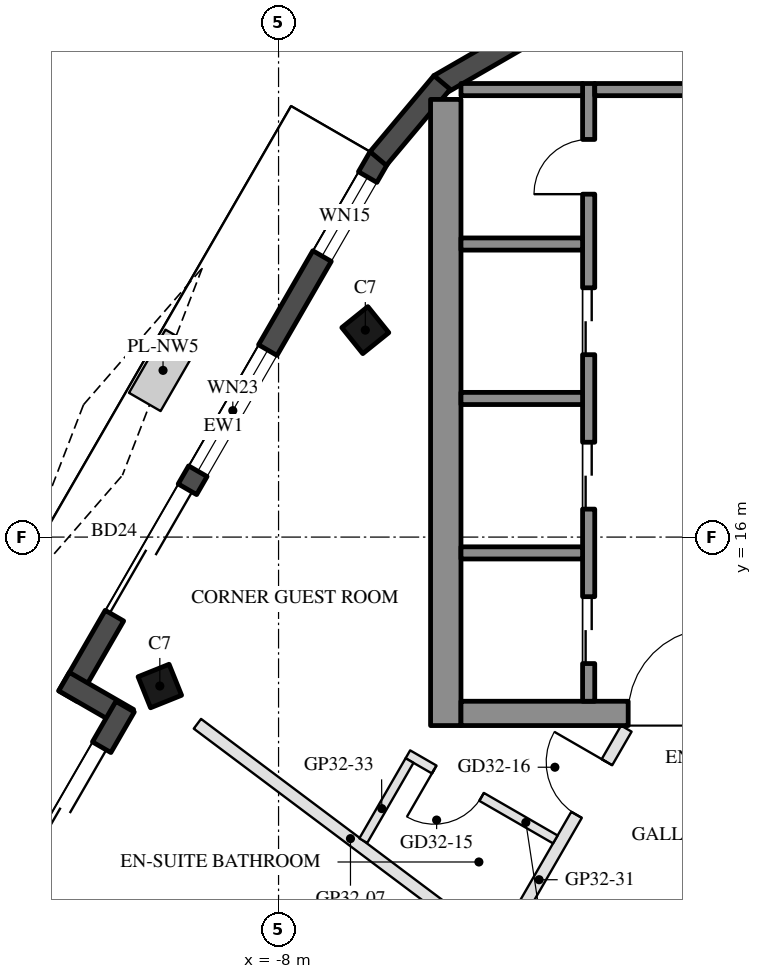
"""IFC4 building model, lengths in metres.
Left out: names, types, materials, properties, quantities, classifications, styles, units other than length and angle.
Written with IfcOpenShell. Run it as: python <this file> out.ifc"""

import sys

from ifc_helpers import new_model, si_unit, direction, frame, frame_2d, origin, origin_2d, place, context, subcontext, project, spatial, rectangle, hollow_rectangle, extrude, boolean, halfspace, element, fill, save


model = new_model("IFC4")
c1 = context("Model", 3, precision=1e-05, world=origin(), true_north=direction((0.0, 1.0)))
c2 = subcontext(c1, "Body", "Model", "MODEL_VIEW")
j1 = project(units=[si_unit("LENGTHUNIT", "METRE"), si_unit("PLANEANGLEUNIT", "RADIAN")], contexts=[c1])
p1 = place(None, origin())
s1 = spatial("IfcSite", under=j1, at=p1, CompositionType="ELEMENT")
p2 = place(p1, origin())
s2 = spatial("IfcBuilding", under=s1, at=p2, CompositionType="ELEMENT")
p3 = place(p2, frame((0.0, 0.0, 309.6)))
s3 = spatial("IfcBuildingStorey", under=s2, at=p3, CompositionType="ELEMENT", Elevation=309.6)
p4 = place(p3, frame((-6.573, 19.404, 0.0), z_axis=(0.069728397733, -0.180050765176, 0.981182792608), x_axis=(0.504276986778, 0.855013934028, 0.12106152661)))
e1 = element("IfcColumn", 1, at=p4, inside=s3, PredefinedType="COLUMN", context=c2, shape_type="SweptSolid", body=[
    boolean("DIFFERENCE", boolean("DIFFERENCE", extrude(hollow_rectangle(XDim=0.55, YDim=0.55, WallThickness=0.025, at=origin_2d()), origin(), (0.0, 0.0, 1.0), 3.771), halfspace(frame((0.0, 0.0, 0.04), z_axis=(0.0, 0.0, 1.0), x_axis=(1.0, 0.0, 0.0)), True)), halfspace(frame((0.0, 0.0, 3.731), z_axis=(0.0, 0.0, 1.0), x_axis=(1.0, 0.0, 0.0)), False)),
])
p5 = place(p3, frame((-9.953, 13.551, 0.0), z_axis=(0.100518860507, -0.128252691192, 0.98663428173), x_axis=(0.503004973265, 0.862140661686, 0.060823320673)))
e2 = element("IfcColumn", 2, at=p5, inside=s3, PredefinedType="COLUMN", context=c2, shape_type="SweptSolid", body=[
    boolean("DIFFERENCE", boolean("DIFFERENCE", extrude(hollow_rectangle(XDim=0.55, YDim=0.55, WallThickness=0.025, at=origin_2d()), origin(), (0.0, 0.0, 1.0), 3.75), halfspace(frame((0.0, 0.0, 0.034), z_axis=(0.0, 0.0, 1.0), x_axis=(1.0, 0.0, 0.0)), True)), halfspace(frame((0.0, 0.0, 3.716), z_axis=(0.0, 0.0, 1.0), x_axis=(1.0, 0.0, 0.0)), False)),
])
p6 = place(p3, frame((-6.344, 22.251, 0.0), z_axis=(0.0, 0.0, 1.0), x_axis=(-0.499983205548, -0.866035099848, 0.0)))
e3 = element("IfcWall", 3, at=p6, inside=s3, PredefinedType="SOLIDWALL", context=c2, shape_type="SweptSolid", body=[
    extrude(rectangle(XDim=10.239, YDim=0.35, at=frame_2d((5.12, 0.0))), origin(), (0.0, 0.0, 1.0), 3.55),
])
p7 = place(p6, frame((0.381, 0.0, 0.3)))
e4 = element("IfcOpeningElement", 4, at=p7, cuts=e3, PredefinedType="OPENING", context=c2, shape_type="SweptSolid", body=[
    extrude(rectangle(XDim=1.5, YDim=2.65, at=frame_2d((0.75, 1.325))), frame((0.0, 0.185, 0.0), z_axis=(0.0, -1.0, 0.0), x_axis=(1.0, 0.0, 0.0)), (0.0, 0.0, 1.0), 0.37),
])
p8 = place(p6, frame((6.31, 0.0, 0.0)))
e5 = element("IfcOpeningElement", 5, at=p8, cuts=e3, PredefinedType="OPENING", context=c2, shape_type="SweptSolid", body=[
    extrude(rectangle(XDim=2.4, YDim=2.4, at=frame_2d((1.2, 1.2))), frame((0.0, 0.185, 0.0), z_axis=(0.0, -1.0, 0.0), x_axis=(1.0, 0.0, 0.0)), (0.0, 0.0, 1.0), 0.37),
])
p9 = place(p6, frame((3.667, 0.0, 0.3)))
e6 = element("IfcOpeningElement", 6, at=p9, cuts=e3, PredefinedType="OPENING", context=c2, shape_type="SweptSolid", body=[
    extrude(rectangle(XDim=2.3, YDim=2.65, at=frame_2d((1.15, 1.325))), frame((0.0, 0.185, 0.0), z_axis=(0.0, -1.0, 0.0), x_axis=(1.0, 0.0, 0.0)), (0.0, 0.0, 1.0), 0.37),
])
p10 = place(p3, frame((-11.528, 13.623, 0.0), z_axis=(0.0, 0.0, 1.0), x_axis=(0.866005645448, -0.500034220881, 0.0)))
e7 = element("IfcWall", 7, at=p10, inside=s3, PredefinedType="SOLIDWALL", context=c2, shape_type="SweptSolid", body=[
    extrude(rectangle(XDim=1.22, YDim=0.35, at=frame_2d((0.61, 0.0))), origin(), (0.0, 0.0, 1.0), 3.55),
])
p11 = place(p3, frame((-10.524, 13.211, 0.0), z_axis=(0.0, 0.0, 1.0), x_axis=(-0.500008054862, -0.866020753258, 0.0)))
e8 = element("IfcWall", 8, at=p11, inside=s3, PredefinedType="SOLIDWALL", context=c2, shape_type="SweptSolid", body=[
    extrude(rectangle(XDim=5.599, YDim=0.35, at=frame_2d((2.8, 0.0))), origin(), (0.0, 0.0, 1.0), 3.55),
])
p12 = place(p11, frame((0.77, 0.0, 0.0)))
e9 = element("IfcOpeningElement", 9, at=p12, cuts=e8, PredefinedType="OPENING", context=c2, shape_type="SweptSolid", body=[
    extrude(rectangle(XDim=2.4, YDim=2.4, at=frame_2d((1.2, 1.2))), frame((0.0, 0.185, 0.0), z_axis=(0.0, -1.0, 0.0), x_axis=(1.0, 0.0, 0.0)), (0.0, 0.0, 1.0), 0.37),
])
p13 = place(p11, frame((3.47, 0.0, 0.3)))
e10 = element("IfcOpeningElement", 10, at=p13, cuts=e8, PredefinedType="OPENING", context=c2, shape_type="SweptSolid", body=[
    extrude(rectangle(XDim=1.8, YDim=2.65, at=frame_2d((0.9, 1.325))), frame((0.0, 0.185, 0.0), z_axis=(0.0, -1.0, 0.0), x_axis=(1.0, 0.0, 0.0)), (0.0, 0.0, 1.0), 0.37),
])
p14 = place(p3, frame((-3.942, 24.256, 0.0), z_axis=(0.0, 0.0, 1.0), x_axis=(-0.866018903231, -0.500011259119, 0.0)))
e11 = element("IfcWall", 11, at=p14, inside=s3, PredefinedType="SOLIDWALL", context=c2, shape_type="SweptSolid", body=[
    extrude(rectangle(XDim=1.634, YDim=0.35, at=frame_2d((0.817, 0.0))), origin(), (0.0, 0.0, 1.0), 3.55),
])
p15 = place(p3, frame((-5.311, 23.478, 0.0), z_axis=(0.0, 0.0, 1.0), x_axis=(-0.642782014883, -0.766049137682, 0.0)))
e12 = element("IfcWall", 12, at=p15, inside=s3, PredefinedType="SOLIDWALL", context=c2, shape_type="SweptSolid", body=[
    extrude(rectangle(XDim=1.634, YDim=0.35, at=frame_2d((0.817, 0.0))), origin(), (0.0, 0.0, 1.0), 3.55),
])
p16 = place(p3, frame((-5.25, 12.9, 0.0), z_axis=(0.0, 0.0, 1.0), x_axis=(0.0, 1.0, 0.0)))
e13 = element("IfcWall", 13, at=p16, inside=s3, PredefinedType="SHEAR", context=c2, shape_type="SweptSolid", body=[
    extrude(rectangle(XDim=10.299, YDim=0.5, at=frame_2d((5.149, 0.0))), origin(), (0.0, 0.0, 1.0), 3.5),
])
p17 = place(p3, frame((5.0, 13.1, 0.0), z_axis=(0.0, 0.0, 1.0), x_axis=(-1.0, 0.0, 0.0)))
e14 = element("IfcWall", 14, at=p17, inside=s3, PredefinedType="SHEAR", context=c2, shape_type="SweptSolid", body=[
    extrude(rectangle(XDim=10.0, YDim=0.4, at=frame_2d((5.0, 0.0))), origin(), (0.0, 0.0, 1.0), 3.5),
])
p18 = place(p17, frame((3.55, 0.0, 0.0)))
e15 = element("IfcOpeningElement", 15, at=p18, cuts=e14, PredefinedType="OPENING", context=c2, shape_type="SweptSolid", body=[
    extrude(rectangle(XDim=1.1, YDim=2.1, at=frame_2d((0.55, 1.05))), frame((0.0, 0.21, 0.0), z_axis=(0.0, -1.0, 0.0), x_axis=(1.0, 0.0, 0.0)), (0.0, 0.0, 1.0), 0.42),
])
p19 = place(p17, frame((5.85, 0.0, 0.0)))
e16 = element("IfcOpeningElement", 16, at=p19, cuts=e14, PredefinedType="OPENING", context=c2, shape_type="SweptSolid", body=[
    extrude(rectangle(XDim=1.4, YDim=2.1, at=frame_2d((0.7, 1.05))), frame((0.0, 0.21, 0.0), z_axis=(0.0, -1.0, 0.0), x_axis=(1.0, 0.0, 0.0)), (0.0, 0.0, 1.0), 0.42),
])
p20 = place(p3, frame((-2.9, 13.3, 0.0), z_axis=(0.0, 0.0, 1.0), x_axis=(0.0, 1.0, 0.0)))
e17 = element("IfcWall", 17, at=p20, inside=s3, PredefinedType="SHEAR", context=c2, shape_type="SweptSolid", body=[
    extrude(rectangle(XDim=10.16, YDim=0.2, at=frame_2d((5.08, 0.0))), origin(), (0.0, 0.0, 1.0), 3.5),
])
p21 = place(p20, frame((0.62, 0.0, 0.0)))
e18 = element("IfcOpeningElement", 18, at=p21, cuts=e17, PredefinedType="OPENING", context=c2, shape_type="SweptSolid", body=[
    extrude(rectangle(XDim=1.1, YDim=2.1, at=frame_2d((0.55, 1.05))), frame((0.0, 0.11, 0.0), z_axis=(0.0, -1.0, 0.0), x_axis=(1.0, 0.0, 0.0)), (0.0, 0.0, 1.0), 0.22),
])
p22 = place(p20, frame((3.16, 0.0, 0.0)))
e19 = element("IfcOpeningElement", 19, at=p22, cuts=e17, PredefinedType="OPENING", context=c2, shape_type="SweptSolid", body=[
    extrude(rectangle(XDim=1.1, YDim=2.1, at=frame_2d((0.55, 1.05))), frame((0.0, 0.11, 0.0), z_axis=(0.0, -1.0, 0.0), x_axis=(1.0, 0.0, 0.0)), (0.0, 0.0, 1.0), 0.22),
])
p23 = place(p20, frame((5.7, 0.0, 0.0)))
e20 = element("IfcOpeningElement", 20, at=p23, cuts=e17, PredefinedType="OPENING", context=c2, shape_type="SweptSolid", body=[
    extrude(rectangle(XDim=1.1, YDim=2.1, at=frame_2d((0.55, 1.05))), frame((0.0, 0.11, 0.0), z_axis=(0.0, -1.0, 0.0), x_axis=(1.0, 0.0, 0.0)), (0.0, 0.0, 1.0), 0.22),
])
p24 = place(p20, frame((8.34, 0.0, 0.0)))
e21 = element("IfcOpeningElement", 21, at=p24, cuts=e17, PredefinedType="OPENING", context=c2, shape_type="SweptSolid", body=[
    extrude(rectangle(XDim=0.9, YDim=2.1, at=frame_2d((0.45, 1.05))), frame((0.0, 0.11, 0.0), z_axis=(0.0, -1.0, 0.0), x_axis=(1.0, 0.0, 0.0)), (0.0, 0.0, 1.0), 0.22),
])
p25 = place(p3, frame((-1.0, 23.36, 0.0), z_axis=(0.0, 0.0, 1.0), x_axis=(-1.0, 0.0, 0.0)))
e22 = element("IfcWall", 22, at=p25, inside=s3, PredefinedType="SHEAR", context=c2, shape_type="SweptSolid", body=[
    extrude(rectangle(XDim=1.8, YDim=0.2, at=frame_2d((0.9, 0.0))), origin(), (0.0, 0.0, 1.0), 3.5),
])
for number, where, z_axis, x_axis in (
    (23, (-3.0, 15.74, 0.0), (0.0, 0.0, 1.0), (-1.0, 0.0, 0.0)),
    (24, (-3.0, 18.28, 0.0), (0.0, 0.0, 1.0), (-1.0, 0.0, 0.0)),
    (25, (-3.0, 20.82, 0.0), (0.0, 0.0, 1.0), (-1.0, 0.0, 0.0)),
    (26, (-3.0, 23.36, 0.0), (0.0, 0.0, 1.0), (-1.0, 0.0, 0.0)),
):
    element("IfcWall", number, at=place(p3, frame(where, z_axis=z_axis, x_axis=x_axis)), inside=s3, PredefinedType="SHEAR", context=c2, shape_type="SweptSolid", body=[
        extrude(rectangle(XDim=2.0, YDim=0.2, at=frame_2d((1.0, 0.0))), origin(), (0.0, 0.0, 1.0), 3.5),
    ])
p26 = place(p3, frame((-9.334, 12.93, 0.0), z_axis=(0.0, 0.0, 1.0), x_axis=(0.799864994536, -0.600179965107, 0.0)))
e27 = element("IfcWall", 27, at=p26, inside=s3, PredefinedType="PARTITIONING", context=c2, shape_type="SweptSolid", body=[
    extrude(rectangle(XDim=6.294, YDim=0.2, at=frame_2d((3.147, 0.0))), origin(), (0.0, 0.0, 1.0), 3.1),
])
p27 = place(p3, frame((-4.33, 9.3, 0.0), z_axis=(0.0, 0.0, 1.0), x_axis=(0.500007699544, 0.866020958405, 0.0)))
e28 = element("IfcWall", 28, at=p27, inside=s3, PredefinedType="PARTITIONING", context=c2, shape_type="SweptSolid", body=[
    extrude(rectangle(XDim=4.1, YDim=0.2, at=frame_2d((2.05, 0.0))), origin(), (0.0, 0.0, 1.0), 3.1),
])
p28 = place(p27, frame((2.462, 0.0, 0.0)))
e29 = element("IfcOpeningElement", 29, at=p28, cuts=e28, PredefinedType="OPENING", context=c2, shape_type="SweptSolid", body=[
    extrude(rectangle(XDim=1.0, YDim=2.1, at=frame_2d((0.5, 1.05))), frame((0.0, 0.11, 0.0), z_axis=(0.0, -1.0, 0.0), x_axis=(1.0, 0.0, 0.0)), (0.0, 0.0, 1.0), 0.22),
])
p29 = place(p3, frame((-3.448, 11.027, 0.0), z_axis=(0.0, 0.0, 1.0), x_axis=(-0.866034573852, 0.49998411664, 0.0)))
e30 = element("IfcWall", 30, at=p29, inside=s3, PredefinedType="PARTITIONING", context=c2, shape_type="SweptSolid", body=[
    extrude(rectangle(XDim=2.8, YDim=0.15, at=frame_2d((1.4, 0.0))), origin(), (0.0, 0.0, 1.0), 3.55),
])
p30 = place(p29, frame((1.4, 0.0, 0.0)))
e31 = element("IfcOpeningElement", 31, at=p30, cuts=e30, PredefinedType="OPENING", context=c2, shape_type="SweptSolid", body=[
    extrude(rectangle(XDim=0.9, YDim=2.1, at=frame_2d((0.45, 1.05))), frame((0.0, 0.085, 0.0), z_axis=(0.0, -1.0, 0.0), x_axis=(1.0, 0.0, 0.0)), (0.0, 0.0, 1.0), 0.17),
])
p31 = place(p3, frame((-5.846, 12.325, 0.0), z_axis=(0.0, 0.0, 1.0), x_axis=(-0.500023511883, -0.866011828767, 0.0)))
e32 = element("IfcWall", 32, at=p31, inside=s3, PredefinedType="PARTITIONING", context=c2, shape_type="SweptSolid", body=[
    extrude(rectangle(XDim=1.521, YDim=0.15, at=frame_2d((0.76, 0.0))), origin(), (0.0, 0.0, 1.0), 3.1),
])
p32 = place(p7, origin())
e33 = element("IfcWindow", 33, at=p32, inside=s3, PartitioningType="SINGLE_PANEL", PredefinedType="WINDOW", context=c2, shape_type="SweptSolid", body=[
    extrude(rectangle(XDim=1.5, YDim=2.65, at=frame_2d((0.75, 1.325))), frame((0.0, 0.03, 0.0), z_axis=(0.0, -1.0, 0.0), x_axis=(1.0, 0.0, 0.0)), (0.0, 0.0, 1.0), 0.06),
])
fill(e4, e33)
p33 = place(p8, frame((2.4, 0.0, 0.0), z_axis=(0.0, 0.0, 1.0), x_axis=(-1.0, 0.0, 0.0)))
e34 = element("IfcDoor", 34, at=p33, inside=s3, OperationType="SLIDING_TO_LEFT", PredefinedType="DOOR", context=c2, shape_type="SweptSolid", body=[
    extrude(rectangle(XDim=2.4, YDim=2.4, at=frame_2d((1.2, 1.2))), frame((0.0, 0.025, 0.0), z_axis=(0.0, -1.0, 0.0), x_axis=(1.0, 0.0, 0.0)), (0.0, 0.0, 1.0), 0.05),
])
fill(e5, e34)
p34 = place(p9, origin())
e35 = element("IfcWindow", 35, at=p34, inside=s3, PartitioningType="SINGLE_PANEL", PredefinedType="WINDOW", context=c2, shape_type="SweptSolid", body=[
    extrude(rectangle(XDim=2.3, YDim=2.65, at=frame_2d((1.15, 1.325))), frame((0.0, 0.03, 0.0), z_axis=(0.0, -1.0, 0.0), x_axis=(1.0, 0.0, 0.0)), (0.0, 0.0, 1.0), 0.06),
])
fill(e6, e35)
p35 = place(p12, frame((2.4, 0.0, 0.0), z_axis=(0.0, 0.0, 1.0), x_axis=(-1.0, 0.0, 0.0)))
e36 = element("IfcDoor", 36, at=p35, inside=s3, OperationType="SLIDING_TO_LEFT", PredefinedType="DOOR", context=c2, shape_type="SweptSolid", body=[
    extrude(rectangle(XDim=2.4, YDim=2.4, at=frame_2d((1.2, 1.2))), frame((0.0, 0.025, 0.0), z_axis=(0.0, -1.0, 0.0), x_axis=(1.0, 0.0, 0.0)), (0.0, 0.0, 1.0), 0.05),
])
fill(e9, e36)
p36 = place(p21, origin())
e37 = element("IfcDoor", 37, at=p36, inside=s3, OperationType="DOUBLE_DOOR_SLIDING", PredefinedType="DOOR", context=c2, shape_type="SweptSolid", body=[
    extrude(rectangle(XDim=1.1, YDim=2.1, at=frame_2d((0.55, 1.05))), frame((0.0, 0.025, 0.0), z_axis=(0.0, -1.0, 0.0), x_axis=(1.0, 0.0, 0.0)), (0.0, 0.0, 1.0), 0.05),
])
fill(e18, e37)
p37 = place(p22, origin())
e38 = element("IfcDoor", 38, at=p37, inside=s3, OperationType="DOUBLE_DOOR_SLIDING", PredefinedType="DOOR", context=c2, shape_type="SweptSolid", body=[
    extrude(rectangle(XDim=1.1, YDim=2.1, at=frame_2d((0.55, 1.05))), frame((0.0, 0.025, 0.0), z_axis=(0.0, -1.0, 0.0), x_axis=(1.0, 0.0, 0.0)), (0.0, 0.0, 1.0), 0.05),
])
fill(e19, e38)
p38 = place(p23, origin())
e39 = element("IfcDoor", 39, at=p38, inside=s3, OperationType="DOUBLE_DOOR_SLIDING", PredefinedType="DOOR", context=c2, shape_type="SweptSolid", body=[
    extrude(rectangle(XDim=1.1, YDim=2.1, at=frame_2d((0.55, 1.05))), frame((0.0, 0.025, 0.0), z_axis=(0.0, -1.0, 0.0), x_axis=(1.0, 0.0, 0.0)), (0.0, 0.0, 1.0), 0.05),
])
fill(e20, e39)
p39 = place(p24, origin())
e40 = element("IfcDoor", 40, at=p39, inside=s3, OperationType="SINGLE_SWING_LEFT", PredefinedType="DOOR", context=c2, shape_type="SweptSolid", body=[
    extrude(rectangle(XDim=0.9, YDim=2.1, at=frame_2d((0.45, 1.05))), frame((0.0, 0.025, 0.0), z_axis=(0.0, -1.0, 0.0), x_axis=(1.0, 0.0, 0.0)), (0.0, 0.0, 1.0), 0.05),
])
fill(e21, e40)
p40 = place(p19, frame((1.4, 0.0, 0.0), z_axis=(0.0, 0.0, 1.0), x_axis=(-1.0, 0.0, 0.0)))
e41 = element("IfcDoor", 41, at=p40, inside=s3, OperationType="DOUBLE_DOOR_SINGLE_SWING", PredefinedType="DOOR", context=c2, shape_type="SweptSolid", body=[
    extrude(rectangle(XDim=1.4, YDim=2.1, at=frame_2d((0.7, 1.05))), frame((0.0, 0.025, 0.0), z_axis=(0.0, -1.0, 0.0), x_axis=(1.0, 0.0, 0.0)), (0.0, 0.0, 1.0), 0.05),
])
fill(e16, e41)
p41 = place(p30, origin())
e42 = element("IfcDoor", 42, at=p41, inside=s3, OperationType="SINGLE_SWING_RIGHT", PredefinedType="DOOR", context=c2, shape_type="SweptSolid", body=[
    extrude(rectangle(XDim=0.9, YDim=2.1, at=frame_2d((0.45, 1.05))), frame((0.0, 0.025, 0.0), z_axis=(0.0, -1.0, 0.0), x_axis=(1.0, 0.0, 0.0)), (0.0, 0.0, 1.0), 0.05),
])
fill(e31, e42)
p42 = place(p28, origin())
e43 = element("IfcDoor", 43, at=p42, inside=s3, OperationType="SINGLE_SWING_RIGHT", PredefinedType="DOOR", context=c2, shape_type="SweptSolid", body=[
    extrude(rectangle(XDim=1.0, YDim=2.1, at=frame_2d((0.5, 1.05))), frame((0.0, 0.025, 0.0), z_axis=(0.0, -1.0, 0.0), x_axis=(1.0, 0.0, 0.0)), (0.0, 0.0, 1.0), 0.05),
])
fill(e29, e43)
save(model, sys.argv[1])
